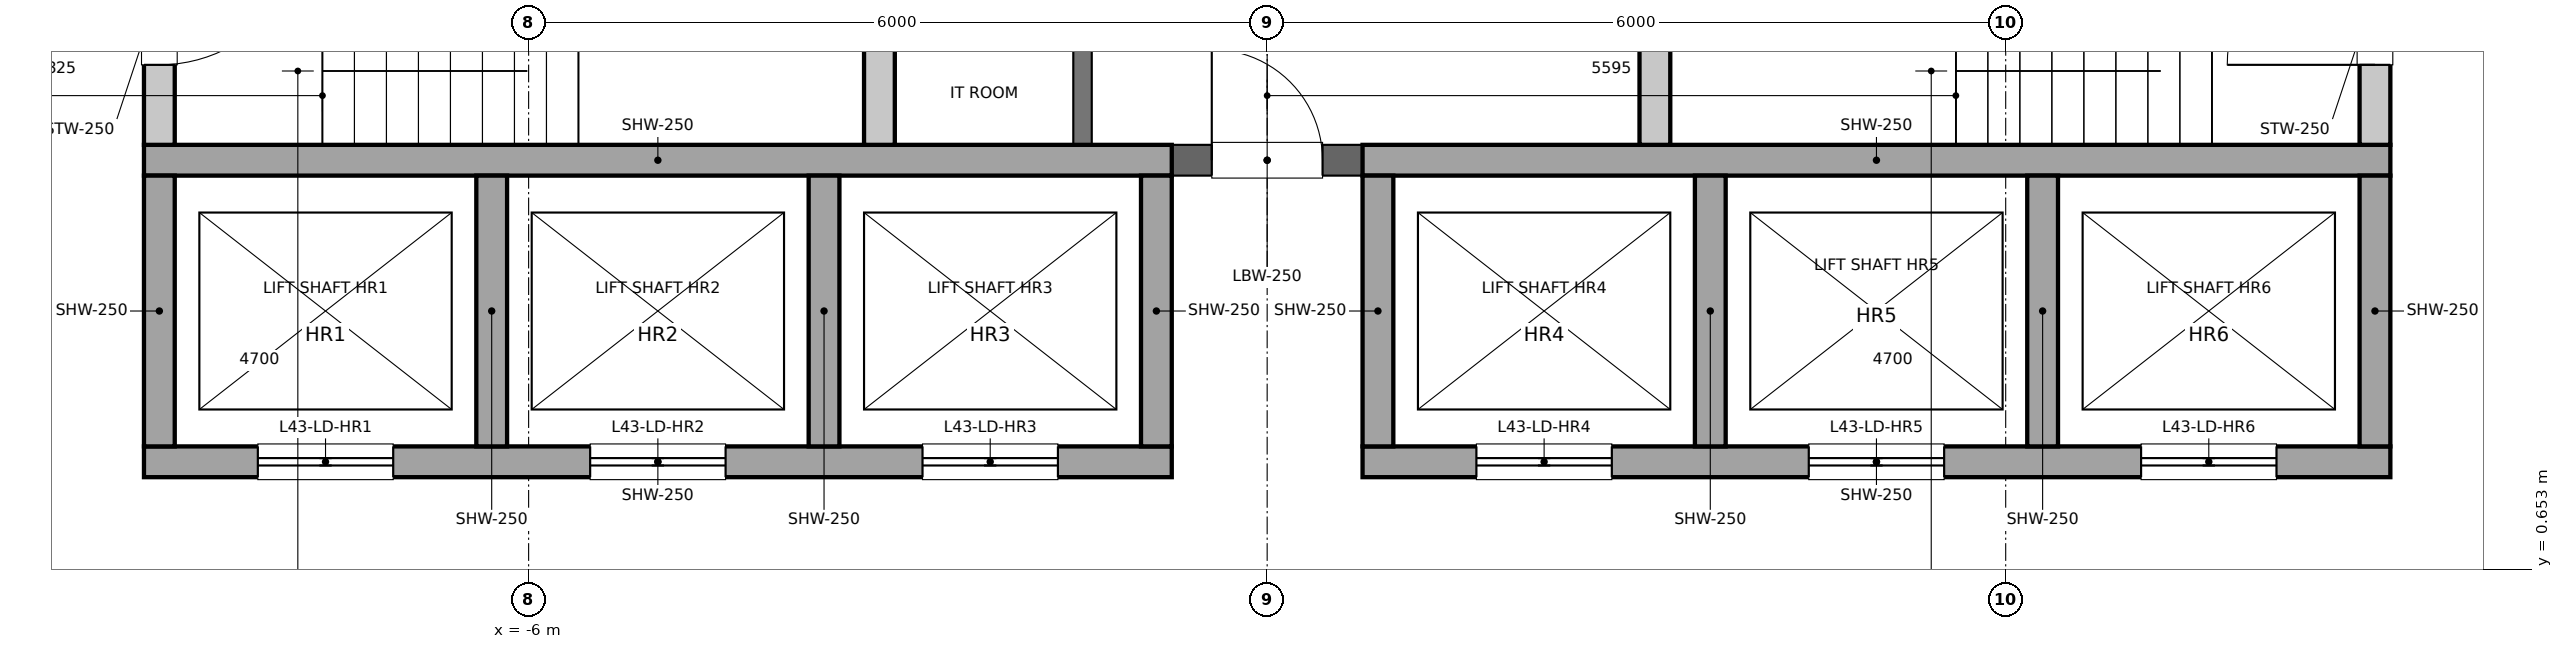
"""IFC4 building model, lengths in metres.
Left out: names, types, materials, properties, quantities, classifications, styles, units other than length and angle.
Written with IfcOpenShell. Run it as: python <this file> out.ifc"""

import sys

from ifc_helpers import new_model, si_unit, direction, frame, frame_2d, origin, place, context, subcontext, project, spatial, rectangle, extrude, element, fill, save


model = new_model("IFC4")
c1 = context("Model", 3, precision=1e-05, world=origin(), true_north=direction((0.0, 1.0)))
c2 = subcontext(c1, "Body", "Model", "MODEL_VIEW")
j1 = project(units=[si_unit("LENGTHUNIT", "METRE"), si_unit("PLANEANGLEUNIT", "RADIAN")], contexts=[c1])
p1 = place(None, origin())
s1 = spatial("IfcSite", under=j1, at=p1, CompositionType="ELEMENT")
p2 = place(p1, origin())
s2 = spatial("IfcBuilding", under=s1, at=p2, CompositionType="ELEMENT")
p3 = place(p2, frame((0.0, 0.0, 203.0)))
s3 = spatial("IfcBuildingStorey", under=s2, at=p3, CompositionType="ELEMENT", Elevation=203.0)
p4 = place(p3, frame((-1.5, 4.1, 0.0), z_axis=(0.0, 0.0, 1.0), x_axis=(0.0, 1.0, 0.0)))
e1 = element("IfcWall", 1, at=p4, inside=s3, PredefinedType="PARTITIONING", context=c2, shape_type="SweptSolid", body=[
    extrude(rectangle(XDim=2.5, YDim=0.15, at=frame_2d((1.25, 0.0))), origin(), (0.0, 0.0, 1.0), 5.7),
])
p5 = place(p4, frame((0.8, 0.0, 0.0)))
e2 = element("IfcOpeningElement", 2, at=p5, cuts=e1, PredefinedType="OPENING", context=c2, shape_type="SweptSolid", body=[
    extrude(rectangle(XDim=0.9, YDim=2.1, at=frame_2d((0.45, 1.05))), frame((0.0, 0.075, 0.0), z_axis=(0.0, -1.0, 0.0), x_axis=(1.0, 0.0, 0.0)), (0.0, 0.0, 1.0), 0.15),
])
p6 = place(p3, frame((-9.0, 4.1, 0.0), z_axis=(0.0, 0.0, 1.0), x_axis=(0.0, 1.0, 0.0)))
e3 = element("IfcWall", 3, at=p6, inside=s3, PredefinedType="SOLIDWALL", context=c2, shape_type="SweptSolid", body=[
    extrude(rectangle(XDim=2.5, YDim=0.25, at=frame_2d((1.25, 0.0))), origin(), (0.0, 0.0, 1.0), 5.7),
])
p7 = place(p6, frame((0.65, 0.0, 0.0)))
e4 = element("IfcOpeningElement", 4, at=p7, cuts=e3, PredefinedType="OPENING", context=c2, shape_type="SweptSolid", body=[
    extrude(rectangle(XDim=1.2, YDim=2.1, at=frame_2d((0.6, 1.05))), frame((0.0, 0.125, 0.0), z_axis=(0.0, -1.0, 0.0), x_axis=(1.0, 0.0, 0.0)), (0.0, 0.0, 1.0), 0.25),
])
p8 = place(p3, frame((9.0, 4.1, 0.0), z_axis=(0.0, 0.0, 1.0), x_axis=(0.0, 1.0, 0.0)))
e5 = element("IfcWall", 5, at=p8, inside=s3, PredefinedType="SOLIDWALL", context=c2, shape_type="SweptSolid", body=[
    extrude(rectangle(XDim=2.5, YDim=0.25, at=frame_2d((1.25, 0.0))), origin(), (0.0, 0.0, 1.0), 5.7),
])
p9 = place(p8, frame((0.65, 0.0, 0.0)))
e6 = element("IfcOpeningElement", 6, at=p9, cuts=e5, PredefinedType="OPENING", context=c2, shape_type="SweptSolid", body=[
    extrude(rectangle(XDim=1.2, YDim=2.1, at=frame_2d((0.6, 1.05))), frame((0.0, 0.125, 0.0), z_axis=(0.0, -1.0, 0.0), x_axis=(1.0, 0.0, 0.0)), (0.0, 0.0, 1.0), 0.25),
])
for number, where, z_axis, x_axis in (
    (7, (-3.15, 4.1, 0.0), (0.0, 0.0, 1.0), (0.0, 1.0, 0.0)),
    (8, (3.15, 4.1, 0.0), (0.0, 0.0, 1.0), (0.0, 1.0, 0.0)),
):
    element("IfcWall", number, at=place(p3, frame(where, z_axis=z_axis, x_axis=x_axis)), inside=s3, PredefinedType="SOLIDWALL", context=c2, shape_type="SweptSolid", body=[
        extrude(rectangle(XDim=2.5, YDim=0.25, at=frame_2d((1.25, 0.0))), origin(), (0.0, 0.0, 1.0), 5.7),
    ])
p10 = place(p3, frame((-0.775, 3.975, 0.0), z_axis=(0.0, 0.0, 1.0), x_axis=(1.0, 0.0, 0.0)))
e9 = element("IfcWall", 9, at=p10, inside=s3, PredefinedType="PARTITIONING", context=c2, shape_type="SweptSolid", body=[
    extrude(rectangle(XDim=1.55, YDim=0.25, at=frame_2d((0.775, 0.0))), origin(), (0.0, 0.0, 1.0), 5.7),
])
p11 = place(p10, frame((0.325, 0.0, 0.0)))
e10 = element("IfcOpeningElement", 10, at=p11, cuts=e9, PredefinedType="OPENING", context=c2, shape_type="SweptSolid", body=[
    extrude(rectangle(XDim=0.9, YDim=2.1, at=frame_2d((0.45, 1.05))), frame((0.0, 0.125, 0.0), z_axis=(0.0, -1.0, 0.0), x_axis=(1.0, 0.0, 0.0)), (0.0, 0.0, 1.0), 0.25),
])
p12 = place(p3, frame((-9.125, 1.525, 0.0), z_axis=(0.0, 0.0, 1.0), x_axis=(1.0, 0.0, 0.0)))
e11 = element("IfcWall", 11, at=p12, inside=s3, PredefinedType="SOLIDWALL", context=c2, shape_type="SweptSolid", body=[
    extrude(rectangle(XDim=8.35, YDim=0.25, at=frame_2d((4.175, 0.0))), origin(), (0.0, 0.0, 1.0), 5.7),
])
p13 = place(p12, frame((0.925, 0.0, 0.0)))
e12 = element("IfcOpeningElement", 12, at=p13, cuts=e11, PredefinedType="OPENING", context=c2, shape_type="SweptSolid", body=[
    extrude(rectangle(XDim=1.1, YDim=2.1, at=frame_2d((0.55, 1.05))), frame((0.0, 0.125, 0.0), z_axis=(0.0, -1.0, 0.0), x_axis=(1.0, 0.0, 0.0)), (0.0, 0.0, 1.0), 0.25),
])
p14 = place(p12, frame((3.625, 0.0, 0.0)))
e13 = element("IfcOpeningElement", 13, at=p14, cuts=e11, PredefinedType="OPENING", context=c2, shape_type="SweptSolid", body=[
    extrude(rectangle(XDim=1.1, YDim=2.1, at=frame_2d((0.55, 1.05))), frame((0.0, 0.125, 0.0), z_axis=(0.0, -1.0, 0.0), x_axis=(1.0, 0.0, 0.0)), (0.0, 0.0, 1.0), 0.25),
])
p15 = place(p12, frame((6.325, 0.0, 0.0)))
e14 = element("IfcOpeningElement", 14, at=p15, cuts=e11, PredefinedType="OPENING", context=c2, shape_type="SweptSolid", body=[
    extrude(rectangle(XDim=1.1, YDim=2.1, at=frame_2d((0.55, 1.05))), frame((0.0, 0.125, 0.0), z_axis=(0.0, -1.0, 0.0), x_axis=(1.0, 0.0, 0.0)), (0.0, 0.0, 1.0), 0.25),
])
p16 = place(p3, frame((0.775, 1.525, 0.0), z_axis=(0.0, 0.0, 1.0), x_axis=(1.0, 0.0, 0.0)))
e15 = element("IfcWall", 15, at=p16, inside=s3, PredefinedType="SOLIDWALL", context=c2, shape_type="SweptSolid", body=[
    extrude(rectangle(XDim=8.35, YDim=0.25, at=frame_2d((4.175, 0.0))), origin(), (0.0, 0.0, 1.0), 5.7),
])
p17 = place(p16, frame((0.925, 0.0, 0.0)))
e16 = element("IfcOpeningElement", 16, at=p17, cuts=e15, PredefinedType="OPENING", context=c2, shape_type="SweptSolid", body=[
    extrude(rectangle(XDim=1.1, YDim=2.1, at=frame_2d((0.55, 1.05))), frame((0.0, 0.125, 0.0), z_axis=(0.0, -1.0, 0.0), x_axis=(1.0, 0.0, 0.0)), (0.0, 0.0, 1.0), 0.25),
])
p18 = place(p16, frame((3.625, 0.0, 0.0)))
e17 = element("IfcOpeningElement", 17, at=p18, cuts=e15, PredefinedType="OPENING", context=c2, shape_type="SweptSolid", body=[
    extrude(rectangle(XDim=1.1, YDim=2.1, at=frame_2d((0.55, 1.05))), frame((0.0, 0.125, 0.0), z_axis=(0.0, -1.0, 0.0), x_axis=(1.0, 0.0, 0.0)), (0.0, 0.0, 1.0), 0.25),
])
p19 = place(p16, frame((6.325, 0.0, 0.0)))
e18 = element("IfcOpeningElement", 18, at=p19, cuts=e15, PredefinedType="OPENING", context=c2, shape_type="SweptSolid", body=[
    extrude(rectangle(XDim=1.1, YDim=2.1, at=frame_2d((0.55, 1.05))), frame((0.0, 0.125, 0.0), z_axis=(0.0, -1.0, 0.0), x_axis=(1.0, 0.0, 0.0)), (0.0, 0.0, 1.0), 0.25),
])
for number, where, z_axis, x_axis in (
    (19, (-9.125, 3.975, 0.0), (0.0, 0.0, 1.0), (1.0, 0.0, 0.0)),
    (20, (0.775, 3.975, 0.0), (0.0, 0.0, 1.0), (1.0, 0.0, 0.0)),
):
    element("IfcWall", number, at=place(p3, frame(where, z_axis=z_axis, x_axis=x_axis)), inside=s3, PredefinedType="SOLIDWALL", context=c2, shape_type="SweptSolid", body=[
        extrude(rectangle(XDim=8.35, YDim=0.25, at=frame_2d((4.175, 0.0))), origin(), (0.0, 0.0, 1.0), 5.7),
    ])
for number, where, z_axis, x_axis in (
    (21, (-9.0, 1.65, 0.0), (0.0, 0.0, 1.0), (0.0, 1.0, 0.0)),
    (22, (9.0, 1.65, 0.0), (0.0, 0.0, 1.0), (0.0, 1.0, 0.0)),
    (23, (-6.3, 1.65, 0.0), (0.0, 0.0, 1.0), (0.0, 1.0, 0.0)),
    (24, (6.3, 1.65, 0.0), (0.0, 0.0, 1.0), (0.0, 1.0, 0.0)),
    (25, (-3.6, 1.65, 0.0), (0.0, 0.0, 1.0), (0.0, 1.0, 0.0)),
    (26, (3.6, 1.65, 0.0), (0.0, 0.0, 1.0), (0.0, 1.0, 0.0)),
    (27, (-0.9, 1.65, 0.0), (0.0, 0.0, 1.0), (0.0, 1.0, 0.0)),
    (28, (0.9, 1.65, 0.0), (0.0, 0.0, 1.0), (0.0, 1.0, 0.0)),
):
    element("IfcWall", number, at=place(p3, frame(where, z_axis=z_axis, x_axis=x_axis)), inside=s3, PredefinedType="SOLIDWALL", context=c2, shape_type="SweptSolid", body=[
        extrude(rectangle(XDim=2.2, YDim=0.25, at=frame_2d((1.1, 0.0))), origin(), (0.0, 0.0, 1.0), 5.7),
    ])
p20 = place(p13, origin())
e29 = element("IfcDoor", 29, at=p20, inside=s3, OperationType="DOUBLE_DOOR_SLIDING", PredefinedType="DOOR", context=c2, shape_type="SweptSolid", body=[
    extrude(rectangle(XDim=1.1, YDim=2.1, at=frame_2d((0.55, 1.05))), frame((0.0, 0.025, 0.0), z_axis=(0.0, -1.0, 0.0), x_axis=(1.0, 0.0, 0.0)), (0.0, 0.0, 1.0), 0.05),
])
fill(e12, e29)
p21 = place(p14, origin())
e30 = element("IfcDoor", 30, at=p21, inside=s3, OperationType="DOUBLE_DOOR_SLIDING", PredefinedType="DOOR", context=c2, shape_type="SweptSolid", body=[
    extrude(rectangle(XDim=1.1, YDim=2.1, at=frame_2d((0.55, 1.05))), frame((0.0, 0.025, 0.0), z_axis=(0.0, -1.0, 0.0), x_axis=(1.0, 0.0, 0.0)), (0.0, 0.0, 1.0), 0.05),
])
fill(e13, e30)
p22 = place(p15, origin())
e31 = element("IfcDoor", 31, at=p22, inside=s3, OperationType="DOUBLE_DOOR_SLIDING", PredefinedType="DOOR", context=c2, shape_type="SweptSolid", body=[
    extrude(rectangle(XDim=1.1, YDim=2.1, at=frame_2d((0.55, 1.05))), frame((0.0, 0.025, 0.0), z_axis=(0.0, -1.0, 0.0), x_axis=(1.0, 0.0, 0.0)), (0.0, 0.0, 1.0), 0.05),
])
fill(e14, e31)
p23 = place(p17, origin())
e32 = element("IfcDoor", 32, at=p23, inside=s3, OperationType="DOUBLE_DOOR_SLIDING", PredefinedType="DOOR", context=c2, shape_type="SweptSolid", body=[
    extrude(rectangle(XDim=1.1, YDim=2.1, at=frame_2d((0.55, 1.05))), frame((0.0, 0.025, 0.0), z_axis=(0.0, -1.0, 0.0), x_axis=(1.0, 0.0, 0.0)), (0.0, 0.0, 1.0), 0.05),
])
fill(e16, e32)
p24 = place(p18, origin())
e33 = element("IfcDoor", 33, at=p24, inside=s3, OperationType="DOUBLE_DOOR_SLIDING", PredefinedType="DOOR", context=c2, shape_type="SweptSolid", body=[
    extrude(rectangle(XDim=1.1, YDim=2.1, at=frame_2d((0.55, 1.05))), frame((0.0, 0.025, 0.0), z_axis=(0.0, -1.0, 0.0), x_axis=(1.0, 0.0, 0.0)), (0.0, 0.0, 1.0), 0.05),
])
fill(e17, e33)
p25 = place(p19, origin())
e34 = element("IfcDoor", 34, at=p25, inside=s3, OperationType="DOUBLE_DOOR_SLIDING", PredefinedType="DOOR", context=c2, shape_type="SweptSolid", body=[
    extrude(rectangle(XDim=1.1, YDim=2.1, at=frame_2d((0.55, 1.05))), frame((0.0, 0.025, 0.0), z_axis=(0.0, -1.0, 0.0), x_axis=(1.0, 0.0, 0.0)), (0.0, 0.0, 1.0), 0.05),
])
fill(e18, e34)
p26 = place(p7, origin())
e35 = element("IfcDoor", 35, at=p26, inside=s3, OperationType="SINGLE_SWING_RIGHT", PredefinedType="DOOR", context=c2, shape_type="SweptSolid", body=[
    extrude(rectangle(XDim=1.2, YDim=2.1, at=frame_2d((0.6, 1.05))), frame((0.0, 0.025, 0.0), z_axis=(0.0, -1.0, 0.0), x_axis=(1.0, 0.0, 0.0)), (0.0, 0.0, 1.0), 0.05),
])
fill(e4, e35)
p27 = place(p9, origin())
e36 = element("IfcDoor", 36, at=p27, inside=s3, OperationType="SINGLE_SWING_LEFT", PredefinedType="DOOR", context=c2, shape_type="SweptSolid", body=[
    extrude(rectangle(XDim=1.2, YDim=2.1, at=frame_2d((0.6, 1.05))), frame((0.0, 0.025, 0.0), z_axis=(0.0, -1.0, 0.0), x_axis=(1.0, 0.0, 0.0)), (0.0, 0.0, 1.0), 0.05),
])
fill(e6, e36)
p28 = place(p11, origin())
e37 = element("IfcDoor", 37, at=p28, inside=s3, OperationType="SINGLE_SWING_LEFT", PredefinedType="DOOR", context=c2, shape_type="SweptSolid", body=[
    extrude(rectangle(XDim=0.9, YDim=2.1, at=frame_2d((0.45, 1.05))), frame((0.0, 0.025, 0.0), z_axis=(0.0, -1.0, 0.0), x_axis=(1.0, 0.0, 0.0)), (0.0, 0.0, 1.0), 0.05),
])
fill(e10, e37)
save(model, sys.argv[1])
